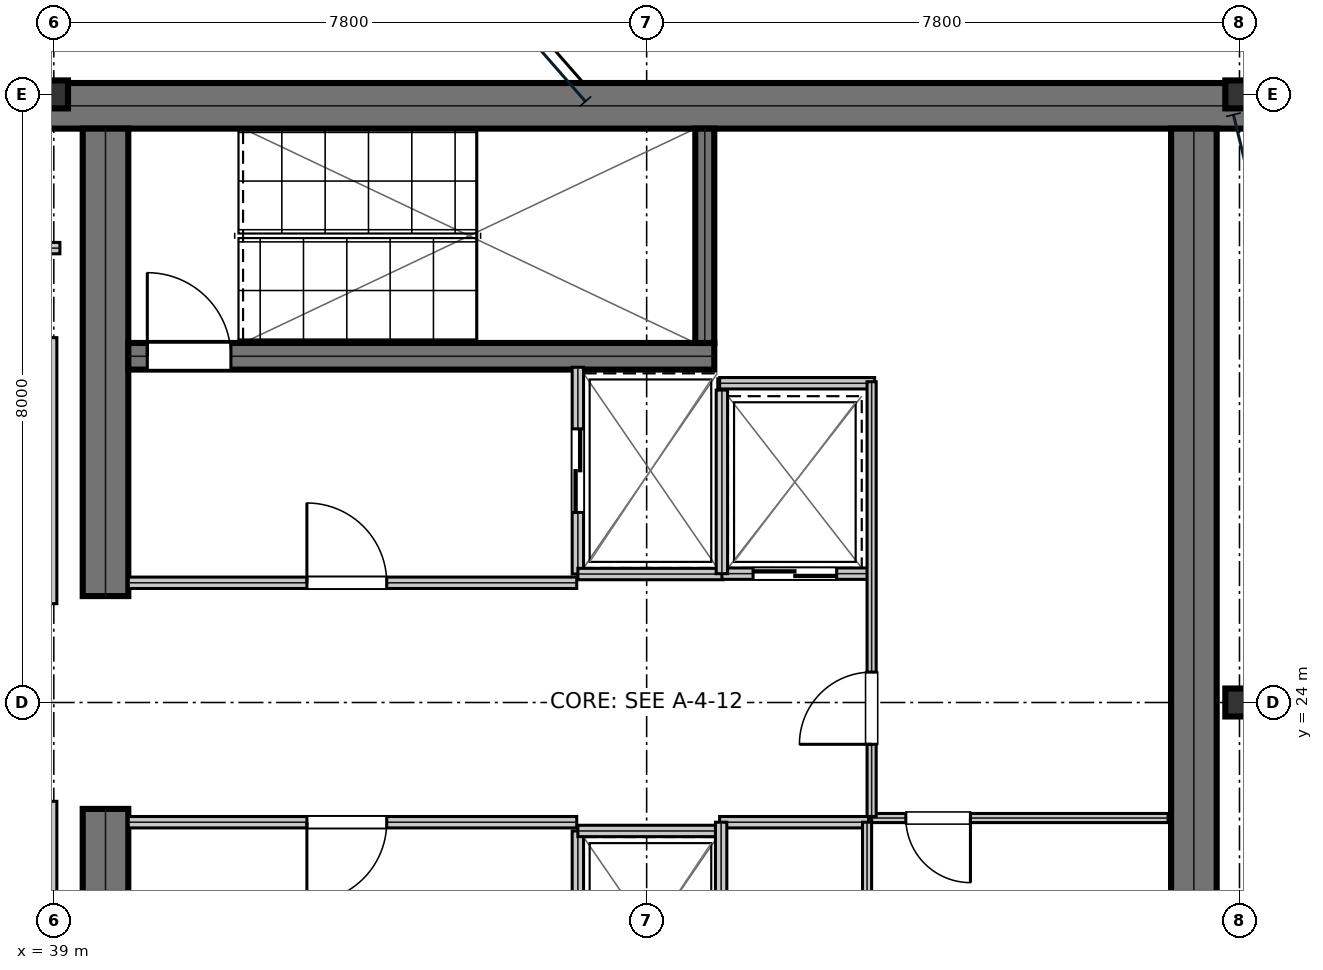
"""IFC4 building model, lengths in metres.
Left out: names, types, materials, properties, quantities, classifications, styles, units other than length and angle.
Written with IfcOpenShell. Run it as: python <this file> out.ifc"""

import sys

from ifc_helpers import new_model, si_unit, direction, frame, frame_2d, origin, origin_2d, place, context, subcontext, project, spatial, rectangle, i_section, extrude, element, fill, save


model = new_model("IFC4")
c1 = context("Model", 3, precision=1e-05, world=origin(), true_north=direction((0.0, 1.0)))
c2 = subcontext(c1, "Body", "Model", "MODEL_VIEW")
j1 = project(units=[si_unit("LENGTHUNIT", "METRE"), si_unit("PLANEANGLEUNIT", "RADIAN")], contexts=[c1])
p1 = place(None, origin())
s1 = spatial("IfcSite", under=j1, at=p1, CompositionType="ELEMENT")
p2 = place(p1, origin())
s2 = spatial("IfcBuilding", under=s1, at=p2, CompositionType="ELEMENT")
p3 = place(p2, frame((0.0, 0.0, 274.95)))
s3 = spatial("IfcBuildingStorey", under=s2, at=p3, CompositionType="ELEMENT", Elevation=274.95)
p4 = place(p3, frame((38.8, 31.85, 0.0), z_axis=(0.0, 0.0, 1.0), x_axis=(1.0, 0.0, 0.0)))
e1 = element("IfcWall", 1, at=p4, inside=s3, PredefinedType="SHEAR", context=c2, shape_type="SweptSolid", body=[
    extrude(rectangle(XDim=16.0, YDim=0.6, at=frame_2d((8.0, 0.0))), origin(), (0.0, 0.0, 1.0), 3.81),
])
for number, where, z_axis, x_axis in (
    (2, (39.68, 16.45, 0.0), (0.0, 0.0, 1.0), (0.0, 1.0, 0.0)),
    (3, (39.68, 25.4, 0.0), (0.0, 0.0, 1.0), (0.0, 1.0, 0.0)),
):
    element("IfcWall", number, at=place(p3, frame(where, z_axis=z_axis, x_axis=x_axis)), inside=s3, PredefinedType="SHEAR", context=c2, shape_type="SweptSolid", body=[
        extrude(rectangle(XDim=6.15, YDim=0.6, at=frame_2d((3.075, 0.0))), origin(), (0.0, 0.0, 1.0), 3.81),
    ])
p5 = place(p3, frame((54.0, 16.45, 0.0), z_axis=(0.0, 0.0, 1.0), x_axis=(0.0, 1.0, 0.0)))
e4 = element("IfcWall", 4, at=p5, inside=s3, PredefinedType="SHEAR", context=c2, shape_type="SweptSolid", body=[
    extrude(rectangle(XDim=15.1, YDim=0.6, at=frame_2d((7.55, 0.0))), origin(), (0.0, 0.0, 1.0), 3.81),
])
p6 = place(p3, frame((39.98, 28.555, 0.0), z_axis=(0.0, 0.0, 1.0), x_axis=(1.0, 0.0, 0.0)))
e5 = element("IfcWall", 5, at=p6, inside=s3, PredefinedType="SHEAR", context=c2, shape_type="SweptSolid", body=[
    extrude(rectangle(XDim=7.71, YDim=0.35, at=frame_2d((3.855, 0.0))), origin(), (0.0, 0.0, 1.0), 3.81),
])
p7 = place(p6, frame((0.25, 0.0, 0.0)))
e6 = element("IfcOpeningElement", 6, at=p7, cuts=e5, PredefinedType="OPENING", context=c2, shape_type="SweptSolid", body=[
    extrude(rectangle(XDim=1.1, YDim=2.15, at=frame_2d((0.55, 1.075))), frame((0.0, 0.185, 0.0), z_axis=(0.0, -1.0, 0.0), x_axis=(1.0, 0.0, 0.0)), (0.0, 0.0, 1.0), 0.37),
])
p8 = place(p3, frame((47.565, 28.73, 0.0), z_axis=(0.0, 0.0, 1.0), x_axis=(0.0, 1.0, 0.0)))
e7 = element("IfcWall", 7, at=p8, inside=s3, PredefinedType="SHEAR", context=c2, shape_type="SweptSolid", body=[
    extrude(rectangle(XDim=2.82, YDim=0.25, at=frame_2d((1.41, 0.0))), origin(), (0.0, 0.0, 1.0), 3.81),
])
for number, where, z_axis, x_axis in (
    (8, (39.0, 32.0, 0.0), (0.0, 0.0, 1.0), (1.0, 0.0, 0.0)),
    (9, (54.6, 24.0, 0.0), (0.0, 0.0, 1.0), (1.0, 0.0, 0.0)),
    (10, (54.6, 32.0, 0.0), (0.0, 0.0, 1.0), (1.0, 0.0, 0.0)),
):
    element("IfcColumn", number, at=place(p3, frame(where, z_axis=z_axis, x_axis=x_axis)), inside=s3, PredefinedType="COLUMN", context=c2, shape_type="SweptSolid", body=[
        extrude(i_section(OverallWidth=0.373, OverallDepth=0.368, WebThickness=0.015, FlangeThickness=0.024, at=origin_2d()), origin(), (0.0, 0.0, 1.0), 4.044),
    ])
p9 = place(p3, frame((39.98, 25.575, 0.0), z_axis=(0.0, 0.0, 1.0), x_axis=(1.0, 0.0, 0.0)))
e11 = element("IfcWall", 11, at=p9, inside=s3, PredefinedType="PARTITIONING", context=c2, shape_type="SweptSolid", body=[
    extrude(rectangle(XDim=5.9, YDim=0.15, at=frame_2d((2.95, 0.0))), origin(), (0.0, 0.0, 1.0), 3.81),
])
p10 = place(p9, frame((2.35, 0.0, 0.0)))
e12 = element("IfcOpeningElement", 12, at=p10, cuts=e11, PredefinedType="OPENING", context=c2, shape_type="SweptSolid", body=[
    extrude(rectangle(XDim=1.05, YDim=2.15, at=frame_2d((0.525, 1.075))), frame((0.0, 0.085, 0.0), z_axis=(0.0, -1.0, 0.0), x_axis=(1.0, 0.0, 0.0)), (0.0, 0.0, 1.0), 0.17),
])
p11 = place(p3, frame((39.98, 22.425, 0.0), z_axis=(0.0, 0.0, 1.0), x_axis=(1.0, 0.0, 0.0)))
e13 = element("IfcWall", 13, at=p11, inside=s3, PredefinedType="PARTITIONING", context=c2, shape_type="SweptSolid", body=[
    extrude(rectangle(XDim=5.9, YDim=0.15, at=frame_2d((2.95, 0.0))), origin(), (0.0, 0.0, 1.0), 3.81),
])
p12 = place(p11, frame((2.35, 0.0, 0.0)))
e14 = element("IfcOpeningElement", 14, at=p12, cuts=e13, PredefinedType="OPENING", context=c2, shape_type="SweptSolid", body=[
    extrude(rectangle(XDim=1.05, YDim=2.15, at=frame_2d((0.525, 1.075))), frame((0.0, 0.085, 0.0), z_axis=(0.0, -1.0, 0.0), x_axis=(1.0, 0.0, 0.0)), (0.0, 0.0, 1.0), 0.17),
])
p13 = place(p3, frame((45.895, 25.69, 0.0), z_axis=(0.0, 0.0, 1.0), x_axis=(0.0, 1.0, 0.0)))
e15 = element("IfcWall", 15, at=p13, inside=s3, PredefinedType="PARTITIONING", context=c2, shape_type="SweptSolid", body=[
    extrude(rectangle(XDim=2.72, YDim=0.15, at=frame_2d((1.36, 0.0))), origin(), (0.0, 0.0, 1.0), 3.81),
])
p14 = place(p13, frame((0.81, 0.0, 0.0)))
e16 = element("IfcOpeningElement", 16, at=p14, cuts=e15, PredefinedType="OPENING", context=c2, shape_type="SweptSolid", body=[
    extrude(rectangle(XDim=1.1, YDim=2.15, at=frame_2d((0.55, 1.075))), frame((0.0, 0.085, 0.0), z_axis=(0.0, -1.0, 0.0), x_axis=(1.0, 0.0, 0.0)), (0.0, 0.0, 1.0), 0.17),
])
p15 = place(p3, frame((45.895, 25.69, 0.0), z_axis=(0.0, 0.0, 1.0), x_axis=(1.0, 0.0, 0.0)))
e17 = element("IfcWall", 17, at=p15, inside=s3, PredefinedType="PARTITIONING", context=c2, shape_type="SweptSolid", body=[
    extrude(rectangle(XDim=1.915, YDim=0.15, at=frame_2d((0.958, 0.0))), origin(), (0.0, 0.0, 1.0), 3.81),
])
p16 = place(p3, frame((45.895, 19.59, 0.0), z_axis=(0.0, 0.0, 1.0), x_axis=(0.0, 1.0, 0.0)))
e18 = element("IfcWall", 18, at=p16, inside=s3, PredefinedType="PARTITIONING", context=c2, shape_type="SweptSolid", body=[
    extrude(rectangle(XDim=2.72, YDim=0.15, at=frame_2d((1.36, 0.0))), origin(), (0.0, 0.0, 1.0), 3.81),
])
p17 = place(p16, frame((0.81, 0.0, 0.0)))
e19 = element("IfcOpeningElement", 19, at=p17, cuts=e18, PredefinedType="OPENING", context=c2, shape_type="SweptSolid", body=[
    extrude(rectangle(XDim=1.1, YDim=2.15, at=frame_2d((0.55, 1.075))), frame((0.0, 0.085, 0.0), z_axis=(0.0, -1.0, 0.0), x_axis=(1.0, 0.0, 0.0)), (0.0, 0.0, 1.0), 0.17),
])
p18 = place(p3, frame((45.895, 22.31, 0.0), z_axis=(0.0, 0.0, 1.0), x_axis=(1.0, 0.0, 0.0)))
e20 = element("IfcWall", 20, at=p18, inside=s3, PredefinedType="PARTITIONING", context=c2, shape_type="SweptSolid", body=[
    extrude(rectangle(XDim=1.915, YDim=0.15, at=frame_2d((0.958, 0.0))), origin(), (0.0, 0.0, 1.0), 3.81),
])
p19 = place(p3, frame((47.79, 25.695, 0.0), z_axis=(0.0, 0.0, 1.0), x_axis=(1.0, 0.0, 0.0)))
e21 = element("IfcWall", 21, at=p19, inside=s3, PredefinedType="PARTITIONING", context=c2, shape_type="SweptSolid", body=[
    extrude(rectangle(XDim=1.92, YDim=0.15, at=frame_2d((0.96, 0.0))), origin(), (0.0, 0.0, 1.0), 3.81),
])
p20 = place(p19, frame((0.41, 0.0, 0.0)))
e22 = element("IfcOpeningElement", 22, at=p20, cuts=e21, PredefinedType="OPENING", context=c2, shape_type="SweptSolid", body=[
    extrude(rectangle(XDim=1.1, YDim=2.15, at=frame_2d((0.55, 1.075))), frame((0.0, 0.085, 0.0), z_axis=(0.0, -1.0, 0.0), x_axis=(1.0, 0.0, 0.0)), (0.0, 0.0, 1.0), 0.17),
])
p21 = place(p3, frame((47.79, 25.695, 0.0), z_axis=(0.0, 0.0, 1.0), x_axis=(0.0, 1.0, 0.0)))
e23 = element("IfcWall", 23, at=p21, inside=s3, PredefinedType="PARTITIONING", context=c2, shape_type="SweptSolid", body=[
    extrude(rectangle(XDim=2.415, YDim=0.15, at=frame_2d((1.208, 0.0))), origin(), (0.0, 0.0, 1.0), 3.81),
])
p22 = place(p3, frame((47.76, 22.425, 0.0), z_axis=(0.0, 0.0, 1.0), x_axis=(1.0, 0.0, 0.0)))
e24 = element("IfcWall", 24, at=p22, inside=s3, PredefinedType="PARTITIONING", context=c2, shape_type="SweptSolid", body=[
    extrude(rectangle(XDim=1.96, YDim=0.15, at=frame_2d((0.98, 0.0))), origin(), (0.0, 0.0, 1.0), 3.81),
])
p23 = place(p3, frame((47.78, 16.45, 0.0), z_axis=(0.0, 0.0, 1.0), x_axis=(0.0, 1.0, 0.0)))
e25 = element("IfcWall", 25, at=p23, inside=s3, PredefinedType="PARTITIONING", context=c2, shape_type="SweptSolid", body=[
    extrude(rectangle(XDim=5.975, YDim=0.15, at=frame_2d((2.988, 0.0))), origin(), (0.0, 0.0, 1.0), 3.81),
])
p24 = place(p3, frame((49.7, 16.48, 0.0), z_axis=(0.0, 0.0, 1.0), x_axis=(0.0, 1.0, 0.0)))
e26 = element("IfcWall", 26, at=p24, inside=s3, PredefinedType="PARTITIONING", context=c2, shape_type="SweptSolid", body=[
    extrude(rectangle(XDim=5.945, YDim=0.12, at=frame_2d((2.973, 0.0))), origin(), (0.0, 0.0, 1.0), 3.81),
])
p25 = place(p24, frame((1.8, 0.0, 0.0)))
e27 = element("IfcOpeningElement", 27, at=p25, cuts=e26, PredefinedType="OPENING", context=c2, shape_type="SweptSolid", body=[
    extrude(rectangle(XDim=0.85, YDim=2.15, at=frame_2d((0.425, 1.075))), frame((0.0, 0.07, 0.0), z_axis=(0.0, -1.0, 0.0), x_axis=(1.0, 0.0, 0.0)), (0.0, 0.0, 1.0), 0.14),
])
p26 = place(p24, frame((3.85, 0.0, 0.0)))
e28 = element("IfcOpeningElement", 28, at=p26, cuts=e26, PredefinedType="OPENING", context=c2, shape_type="SweptSolid", body=[
    extrude(rectangle(XDim=0.95, YDim=2.15, at=frame_2d((0.475, 1.075))), frame((0.0, 0.07, 0.0), z_axis=(0.0, -1.0, 0.0), x_axis=(1.0, 0.0, 0.0)), (0.0, 0.0, 1.0), 0.14),
])
p27 = place(p3, frame((49.76, 22.48, 0.0), z_axis=(0.0, 0.0, 1.0), x_axis=(1.0, 0.0, 0.0)))
e29 = element("IfcWall", 29, at=p27, inside=s3, PredefinedType="PARTITIONING", context=c2, shape_type="SweptSolid", body=[
    extrude(rectangle(XDim=3.9, YDim=0.12, at=frame_2d((1.95, 0.0))), origin(), (0.0, 0.0, 1.0), 3.81),
])
p28 = place(p27, frame((0.45, 0.0, 0.0)))
e30 = element("IfcOpeningElement", 30, at=p28, cuts=e29, PredefinedType="OPENING", context=c2, shape_type="SweptSolid", body=[
    extrude(rectangle(XDim=0.85, YDim=2.15, at=frame_2d((0.425, 1.075))), frame((0.0, 0.07, 0.0), z_axis=(0.0, -1.0, 0.0), x_axis=(1.0, 0.0, 0.0)), (0.0, 0.0, 1.0), 0.14),
])
p29 = place(p3, frame((47.76, 28.2, 0.0), z_axis=(0.0, 0.0, 1.0), x_axis=(1.0, 0.0, 0.0)))
e31 = element("IfcWall", 31, at=p29, inside=s3, PredefinedType="PARTITIONING", context=c2, shape_type="SweptSolid", body=[
    extrude(rectangle(XDim=2.04, YDim=0.15, at=frame_2d((1.02, 0.0))), origin(), (0.0, 0.0, 1.0), 3.81),
])
p30 = place(p3, frame((49.76, 22.5, 0.0), z_axis=(0.0, 0.0, 1.0), x_axis=(0.0, 1.0, 0.0)))
e32 = element("IfcWall", 32, at=p30, inside=s3, PredefinedType="PARTITIONING", context=c2, shape_type="SweptSolid", body=[
    extrude(rectangle(XDim=5.72, YDim=0.12, at=frame_2d((2.86, 0.0))), origin(), (0.0, 0.0, 1.0), 3.81),
])
p31 = place(p30, frame((0.95, 0.0, 0.0)))
e33 = element("IfcOpeningElement", 33, at=p31, cuts=e32, PredefinedType="OPENING", context=c2, shape_type="SweptSolid", body=[
    extrude(rectangle(XDim=0.95, YDim=2.15, at=frame_2d((0.475, 1.075))), frame((0.0, 0.07, 0.0), z_axis=(0.0, -1.0, 0.0), x_axis=(1.0, 0.0, 0.0)), (0.0, 0.0, 1.0), 0.14),
])
p32 = place(p3, frame((38.95, 18.8, 0.0), z_axis=(0.0, 0.0, 1.0), x_axis=(0.0, 1.0, 0.0)))
e34 = element("IfcWall", 34, at=p32, inside=s3, PredefinedType="SOLIDWALL", context=c2, shape_type="SweptSolid", body=[
    extrude(rectangle(XDim=3.9, YDim=0.18, at=frame_2d((1.95, 0.0))), origin(), (0.0, 0.0, 1.0), 3.54),
])
p33 = place(p3, frame((38.95, 25.3, 0.0), z_axis=(0.0, 0.0, 1.0), x_axis=(0.0, 1.0, 0.0)))
e35 = element("IfcWall", 35, at=p33, inside=s3, PredefinedType="SOLIDWALL", context=c2, shape_type="SweptSolid", body=[
    extrude(rectangle(XDim=3.5, YDim=0.18, at=frame_2d((1.75, 0.0))), origin(), (0.0, 0.0, 1.0), 3.54),
])
p34 = place(p3, frame((35.938, 29.978, 0.0), z_axis=(0.0, 0.0, 1.0), x_axis=(1.0, 0.0, 0.0)))
e36 = element("IfcWall", 36, at=p34, inside=s3, PredefinedType="MOVABLE", context=c2, shape_type="SweptSolid", body=[
    extrude(rectangle(XDim=3.142, YDim=0.15, at=frame_2d((1.571, 0.0))), origin(), (0.0, 0.0, 1.0), 3.54),
])
p35 = place(p10, origin())
e37 = element("IfcDoor", 37, at=p35, inside=s3, OperationType="SINGLE_SWING_LEFT", PredefinedType="DOOR", context=c2, shape_type="SweptSolid", body=[
    extrude(rectangle(XDim=1.05, YDim=2.15, at=frame_2d((0.525, 1.075))), frame((0.0, 0.025, 0.0), z_axis=(0.0, -1.0, 0.0), x_axis=(1.0, 0.0, 0.0)), (0.0, 0.0, 1.0), 0.05),
])
fill(e12, e37)
p36 = place(p12, frame((1.05, 0.0, 0.0), z_axis=(0.0, 0.0, 1.0), x_axis=(-1.0, 0.0, 0.0)))
e38 = element("IfcDoor", 38, at=p36, inside=s3, OperationType="SINGLE_SWING_RIGHT", PredefinedType="DOOR", context=c2, shape_type="SweptSolid", body=[
    extrude(rectangle(XDim=1.05, YDim=2.15, at=frame_2d((0.525, 1.075))), frame((0.0, 0.025, 0.0), z_axis=(0.0, -1.0, 0.0), x_axis=(1.0, 0.0, 0.0)), (0.0, 0.0, 1.0), 0.05),
])
fill(e14, e38)
p37 = place(p14, frame((1.1, 0.0, 0.0), z_axis=(0.0, 0.0, 1.0), x_axis=(-1.0, 0.0, 0.0)))
e39 = element("IfcDoor", 39, at=p37, inside=s3, OperationType="DOUBLE_DOOR_SLIDING", PredefinedType="DOOR", context=c2, shape_type="SweptSolid", body=[
    extrude(rectangle(XDim=1.1, YDim=2.15, at=frame_2d((0.55, 1.075))), frame((0.0, 0.025, 0.0), z_axis=(0.0, -1.0, 0.0), x_axis=(1.0, 0.0, 0.0)), (0.0, 0.0, 1.0), 0.05),
])
fill(e16, e39)
p38 = place(p20, frame((1.1, 0.0, 0.0), z_axis=(0.0, 0.0, 1.0), x_axis=(-1.0, 0.0, 0.0)))
e40 = element("IfcDoor", 40, at=p38, inside=s3, OperationType="DOUBLE_DOOR_SLIDING", PredefinedType="DOOR", context=c2, shape_type="SweptSolid", body=[
    extrude(rectangle(XDim=1.1, YDim=2.15, at=frame_2d((0.55, 1.075))), frame((0.0, 0.025, 0.0), z_axis=(0.0, -1.0, 0.0), x_axis=(1.0, 0.0, 0.0)), (0.0, 0.0, 1.0), 0.05),
])
fill(e22, e40)
p39 = place(p28, frame((0.85, 0.0, 0.0), z_axis=(0.0, 0.0, 1.0), x_axis=(-1.0, 0.0, 0.0)))
e41 = element("IfcDoor", 41, at=p39, inside=s3, OperationType="SINGLE_SWING_LEFT", PredefinedType="DOOR", context=c2, shape_type="SweptSolid", body=[
    extrude(rectangle(XDim=0.85, YDim=2.15, at=frame_2d((0.425, 1.075))), frame((0.0, 0.025, 0.0), z_axis=(0.0, -1.0, 0.0), x_axis=(1.0, 0.0, 0.0)), (0.0, 0.0, 1.0), 0.05),
])
fill(e30, e41)
p40 = place(p31, origin())
e42 = element("IfcDoor", 42, at=p40, inside=s3, OperationType="SINGLE_SWING_LEFT", PredefinedType="DOOR", context=c2, shape_type="SweptSolid", body=[
    extrude(rectangle(XDim=0.95, YDim=2.15, at=frame_2d((0.475, 1.075))), frame((0.0, 0.025, 0.0), z_axis=(0.0, -1.0, 0.0), x_axis=(1.0, 0.0, 0.0)), (0.0, 0.0, 1.0), 0.05),
])
fill(e33, e42)
p41 = place(p7, origin())
e43 = element("IfcDoor", 43, at=p41, inside=s3, OperationType="SINGLE_SWING_LEFT", PredefinedType="DOOR", context=c2, shape_type="SweptSolid", body=[
    extrude(rectangle(XDim=1.1, YDim=2.15, at=frame_2d((0.55, 1.075))), frame((0.0, 0.025, 0.0), z_axis=(0.0, -1.0, 0.0), x_axis=(1.0, 0.0, 0.0)), (0.0, 0.0, 1.0), 0.05),
])
fill(e6, e43)
save(model, sys.argv[1])
